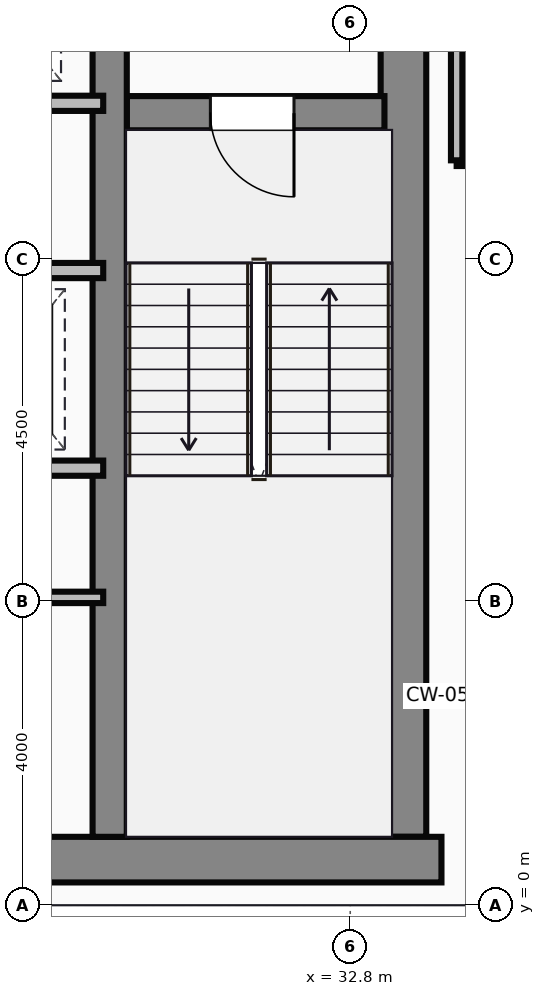
"""IFC4 building model, lengths in metres.
Left out: names, types, materials, properties, quantities, classifications, styles, units other than length and angle.
Written with IfcOpenShell. Run it as: python <this file> out.ifc"""

import sys

from ifc_helpers import new_model, si_unit, direction, frame, frame_2d, origin, place, context, subcontext, project, spatial, rectangle, extrude, source, transform, mapped, element, fill, save


model = new_model("IFC4")
c1 = context("Model", 3, precision=1e-05, world=origin(), true_north=direction((0.0, 1.0)))
c2 = subcontext(c1, "Body", "Model", "MODEL_VIEW")
j1 = project(units=[si_unit("LENGTHUNIT", "METRE"), si_unit("PLANEANGLEUNIT", "RADIAN")], contexts=[c1])
p1 = place(None, origin())
s1 = spatial("IfcSite", under=j1, at=p1, CompositionType="ELEMENT")
p2 = place(p1, origin())
s2 = spatial("IfcBuilding", under=s1, at=p2, CompositionType="ELEMENT")
p3 = place(p2, frame((0.0, 0.0, 210.5)))
s3 = spatial("IfcBuildingStorey", under=s2, at=p3, CompositionType="ELEMENT", Elevation=210.5)
m1 = source(origin(), c2, "Body", "SweptSolid", [
    extrude(rectangle(XDim=29.5, YDim=0.6, at=frame_2d((14.75, 0.0))), origin(), (0.0, 0.0, 1.0), 3.65),
])
p4 = place(p3, frame((4.5, 0.6, 0.0), z_axis=(0.0, 0.0, 1.0), x_axis=(1.0, 0.0, 0.0)))
e1 = element("IfcWall", 1, at=p4, inside=s3, PredefinedType="SHEAR", context=c2, shape_type="MappedRepresentation", body=[
    mapped(m1, transform((0.0, 0.0, 0.0))),
])
m2 = source(origin(), c2, "Body", "SweptSolid", [
    extrude(rectangle(XDim=13.1, YDim=0.6, at=frame_2d((6.55, 0.0))), origin(), (0.0, 0.0, 1.0), 3.65),
])
p5 = place(p3, frame((33.5, 0.9, 0.0), z_axis=(0.0, 0.0, 1.0), x_axis=(0.0, 1.0, 0.0)))
e2 = element("IfcWall", 2, at=p5, inside=s3, PredefinedType="SHEAR", context=c2, shape_type="MappedRepresentation", body=[
    mapped(m2, transform((0.0, 0.0, 0.0))),
])
m3 = source(origin(), c2, "Body", "SweptSolid", [
    extrude(rectangle(XDim=12.5, YDim=0.45, at=frame_2d((6.25, 0.0))), origin(), (0.0, 0.0, 1.0), 3.65),
])
p6 = place(p3, frame((29.635, 0.9, 0.0), z_axis=(0.0, 0.0, 1.0), x_axis=(0.0, 1.0, 0.0)))
e3 = element("IfcWall", 3, at=p6, inside=s3, PredefinedType="SHEAR", context=c2, shape_type="MappedRepresentation", body=[
    mapped(m3, transform((0.0, 0.0, 0.0))),
])
m4 = source(origin(), c2, "Body", "SweptSolid", [
    extrude(rectangle(XDim=3.39, YDim=0.45, at=frame_2d((1.695, 0.0))), origin(), (0.0, 0.0, 1.0), 3.65),
])
p7 = place(p3, frame((29.86, 10.42, 0.0), z_axis=(0.0, 0.0, 1.0), x_axis=(1.0, 0.0, 0.0)))
e4 = element("IfcWall", 4, at=p7, inside=s3, PredefinedType="SHEAR", context=c2, shape_type="MappedRepresentation", body=[
    mapped(m4, transform((0.0, 0.0, 0.0))),
])
p8 = place(p7, frame((1.1, 0.0, 0.0)))
e5 = element("IfcOpeningElement", 5, at=p8, cuts=e4, PredefinedType="OPENING", context=c2, shape_type="SweptSolid", body=[
    extrude(rectangle(XDim=1.1, YDim=2.15, at=frame_2d((0.55, 1.075))), frame((0.0, 0.235, 0.0), z_axis=(0.0, -1.0, 0.0), x_axis=(1.0, 0.0, 0.0)), (0.0, 0.0, 1.0), 0.47),
])
m5 = source(origin(), c2, "Body", "SweptSolid", [
    extrude(rectangle(XDim=8.8, YDim=0.2, at=frame_2d((4.4, 0.0))), origin(), (0.0, 0.0, 1.0), 3.4),
])
p9 = place(p3, frame((20.75, 10.55, 0.0), z_axis=(0.0, 0.0, 1.0), x_axis=(1.0, 0.0, 0.0)))
e6 = element("IfcWall", 6, at=p9, inside=s3, PredefinedType="PARTITIONING", context=c2, shape_type="MappedRepresentation", body=[
    mapped(m5, transform((0.0, 0.0, 0.0))),
])
p10 = place(p9, frame((0.5, 0.0, 0.0)))
e7 = element("IfcOpeningElement", 7, at=p10, cuts=e6, PredefinedType="OPENING", context=c2, shape_type="SweptSolid", body=[
    extrude(rectangle(XDim=1.05, YDim=2.15, at=frame_2d((0.525, 1.075))), frame((0.0, 0.11, 0.0), z_axis=(0.0, -1.0, 0.0), x_axis=(1.0, 0.0, 0.0)), (0.0, 0.0, 1.0), 0.22),
])
p11 = place(p9, frame((2.6, 0.0, 0.0)))
e8 = element("IfcOpeningElement", 8, at=p11, cuts=e6, PredefinedType="OPENING", context=c2, shape_type="SweptSolid", body=[
    extrude(rectangle(XDim=1.05, YDim=2.15, at=frame_2d((0.525, 1.075))), frame((0.0, 0.11, 0.0), z_axis=(0.0, -1.0, 0.0), x_axis=(1.0, 0.0, 0.0)), (0.0, 0.0, 1.0), 0.22),
])
p12 = place(p9, frame((4.7, 0.0, 0.0)))
e9 = element("IfcOpeningElement", 9, at=p12, cuts=e6, PredefinedType="OPENING", context=c2, shape_type="SweptSolid", body=[
    extrude(rectangle(XDim=1.05, YDim=2.15, at=frame_2d((0.525, 1.075))), frame((0.0, 0.11, 0.0), z_axis=(0.0, -1.0, 0.0), x_axis=(1.0, 0.0, 0.0)), (0.0, 0.0, 1.0), 0.22),
])
p13 = place(p9, frame((6.8, 0.0, 0.0)))
e10 = element("IfcOpeningElement", 10, at=p13, cuts=e6, PredefinedType="OPENING", context=c2, shape_type="SweptSolid", body=[
    extrude(rectangle(XDim=1.05, YDim=2.15, at=frame_2d((0.525, 1.075))), frame((0.0, 0.11, 0.0), z_axis=(0.0, -1.0, 0.0), x_axis=(1.0, 0.0, 0.0)), (0.0, 0.0, 1.0), 0.22),
])
m6 = source(origin(), c2, "Body", "SweptSolid", [
    extrude(rectangle(XDim=4.55, YDim=0.2, at=frame_2d((2.275, 0.0))), origin(), (0.0, 0.0, 1.0), 3.4),
])
p14 = place(p3, frame((25.0, 8.35, 0.0), z_axis=(0.0, 0.0, 1.0), x_axis=(1.0, 0.0, 0.0)))
e11 = element("IfcWall", 11, at=p14, inside=s3, PredefinedType="PARTITIONING", context=c2, shape_type="MappedRepresentation", body=[
    mapped(m6, transform((0.0, 0.0, 0.0))),
])
p15 = place(p14, frame((0.5, 0.0, 0.0)))
e12 = element("IfcOpeningElement", 12, at=p15, cuts=e11, PredefinedType="OPENING", context=c2, shape_type="SweptSolid", body=[
    extrude(rectangle(XDim=1.05, YDim=2.15, at=frame_2d((0.525, 1.075))), frame((0.0, 0.11, 0.0), z_axis=(0.0, -1.0, 0.0), x_axis=(1.0, 0.0, 0.0)), (0.0, 0.0, 1.0), 0.22),
])
p16 = place(p14, frame((2.6, 0.0, 0.0)))
e13 = element("IfcOpeningElement", 13, at=p16, cuts=e11, PredefinedType="OPENING", context=c2, shape_type="SweptSolid", body=[
    extrude(rectangle(XDim=1.05, YDim=2.15, at=frame_2d((0.525, 1.075))), frame((0.0, 0.11, 0.0), z_axis=(0.0, -1.0, 0.0), x_axis=(1.0, 0.0, 0.0)), (0.0, 0.0, 1.0), 0.22),
])
p17 = place(p3, frame((25.0, 5.75, 0.0), z_axis=(0.0, 0.0, 1.0), x_axis=(1.0, 0.0, 0.0)))
e14 = element("IfcWall", 14, at=p17, inside=s3, PredefinedType="PARTITIONING", context=c2, shape_type="MappedRepresentation", body=[
    mapped(m6, transform((0.0, 0.0, 0.0))),
])
m7 = source(origin(), c2, "Body", "SweptSolid", [
    extrude(rectangle(XDim=4.55, YDim=0.15, at=frame_2d((2.275, 0.0))), origin(), (0.0, 0.0, 1.0), 3.4),
])
p18 = place(p3, frame((25.0, 4.05, 0.0), z_axis=(0.0, 0.0, 1.0), x_axis=(1.0, 0.0, 0.0)))
e15 = element("IfcWall", 15, at=p18, inside=s3, PredefinedType="PARTITIONING", context=c2, shape_type="MappedRepresentation", body=[
    mapped(m7, transform((0.0, 0.0, 0.0))),
])
m8 = source(origin(), c2, "Body", "SweptSolid", [
    extrude(rectangle(XDim=4.8, YDim=0.15, at=frame_2d((2.4, 0.0))), origin(), (0.0, 0.0, 1.0), 3.4),
])
p19 = place(p3, frame((34.2, 9.8, 0.0), z_axis=(0.0, 0.0, 1.0), x_axis=(1.0, 0.0, 0.0)))
e16 = element("IfcWall", 16, at=p19, inside=s3, PredefinedType="PARTITIONING", context=c2, shape_type="MappedRepresentation", body=[
    mapped(m8, transform((0.0, 0.0, 0.0))),
])
m9 = source(origin(), c2, "Body", "SweptSolid", [
    extrude(rectangle(XDim=4.18, YDim=0.15, at=frame_2d((2.09, 0.0))), origin(), (0.0, 0.0, 1.0), 3.4),
])
p20 = place(p3, frame((34.2, 9.8, 0.0), z_axis=(0.0, 0.0, 1.0), x_axis=(0.0, 1.0, 0.0)))
e17 = element("IfcWall", 17, at=p20, inside=s3, PredefinedType="PARTITIONING", context=c2, shape_type="MappedRepresentation", body=[
    mapped(m9, transform((0.0, 0.0, 0.0))),
])
m10 = source(origin(), c2, "Body", "SweptSolid", [
    extrude(rectangle(XDim=1.1, YDim=2.15, at=frame_2d((0.55, 1.075))), frame((0.0, 0.025, 0.0), z_axis=(0.0, -1.0, 0.0), x_axis=(1.0, 0.0, 0.0)), (0.0, 0.0, 1.0), 0.05),
])
p21 = place(p8, frame((1.1, 0.0, 0.0), z_axis=(0.0, 0.0, 1.0), x_axis=(-1.0, 0.0, 0.0)))
e18 = element("IfcDoor", 18, at=p21, inside=s3, OperationType="SINGLE_SWING_RIGHT", PredefinedType="DOOR", context=c2, shape_type="MappedRepresentation", body=[
    mapped(m10, transform((0.0, 0.0, 0.0))),
])
fill(e5, e18)
save(model, sys.argv[1])
